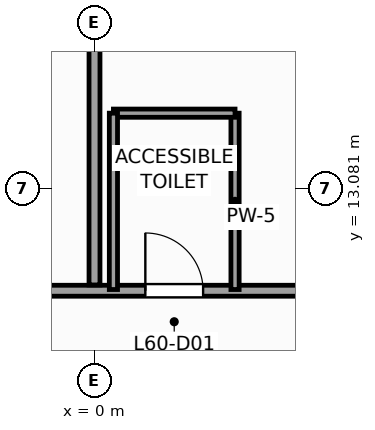
"""IFC4 building model, lengths in metres.
Left out: names, types, materials, properties, quantities, classifications, styles, units other than length and angle.
Written with IfcOpenShell. Run it as: python <this file> out.ifc"""

import sys

from ifc_helpers import new_model, si_unit, direction, frame, frame_2d, origin, place, context, subcontext, project, spatial, rectangle, extrude, source, transform, mapped, element, fill, save


model = new_model("IFC4")
c1 = context("Model", 3, precision=1e-05, world=origin(), true_north=direction((0.0, 1.0)))
c2 = subcontext(c1, "Body", "Model", "MODEL_VIEW")
j1 = project(units=[si_unit("LENGTHUNIT", "METRE"), si_unit("PLANEANGLEUNIT", "RADIAN")], contexts=[c1])
p1 = place(None, origin())
s1 = spatial("IfcSite", under=j1, at=p1, CompositionType="ELEMENT")
p2 = place(p1, origin())
s2 = spatial("IfcBuilding", under=s1, at=p2, CompositionType="ELEMENT")
p3 = place(p2, frame((0.0, 0.0, 248.5)))
s3 = spatial("IfcBuildingStorey", under=s2, at=p3, CompositionType="ELEMENT", Elevation=248.5)
p4 = place(p3, frame((29.154, 6.733, 0.0), z_axis=(0.0, 0.0, 1.0), x_axis=(-0.77714192302, 0.629325378072, 0.0)))
e1 = element("IfcWall", 1, at=p4, inside=s3, PredefinedType="STANDARD", context=c2, shape_type="SweptSolid", body=[
    extrude(rectangle(XDim=36.84, YDim=0.34, at=frame_2d((18.42, 0.0))), origin(), (0.0, 0.0, 1.0), 2.96),
])
p5 = place(p4, frame((3.721, 0.0, 0.48)))
e2 = element("IfcOpeningElement", 2, at=p5, cuts=e1, PredefinedType="OPENING", context=c2, shape_type="SweptSolid", body=[
    extrude(rectangle(XDim=1.4, YDim=2.4, at=frame_2d((0.7, 1.2))), frame((0.0, 0.18, 0.0), z_axis=(0.0, -1.0, 0.0), x_axis=(1.0, 0.0, 0.0)), (0.0, 0.0, 1.0), 0.36),
])
p6 = place(p4, frame((9.809, 0.0, 0.58)))
e3 = element("IfcOpeningElement", 3, at=p6, cuts=e1, PredefinedType="OPENING", context=c2, shape_type="SweptSolid", body=[
    extrude(rectangle(XDim=1.75, YDim=2.3, at=frame_2d((0.875, 1.15))), frame((0.0, 0.18, 0.0), z_axis=(0.0, -1.0, 0.0), x_axis=(1.0, 0.0, 0.0)), (0.0, 0.0, 1.0), 0.36),
])
p7 = place(p4, frame((16.058, 0.0, 0.58)))
e4 = element("IfcOpeningElement", 4, at=p7, cuts=e1, PredefinedType="OPENING", context=c2, shape_type="SweptSolid", body=[
    extrude(rectangle(XDim=1.75, YDim=2.3, at=frame_2d((0.875, 1.15))), frame((0.0, 0.18, 0.0), z_axis=(0.0, -1.0, 0.0), x_axis=(1.0, 0.0, 0.0)), (0.0, 0.0, 1.0), 0.36),
])
p8 = place(p4, frame((24.176, 0.0, 0.58)))
e5 = element("IfcOpeningElement", 5, at=p8, cuts=e1, PredefinedType="OPENING", context=c2, shape_type="SweptSolid", body=[
    extrude(rectangle(XDim=1.75, YDim=2.3, at=frame_2d((0.875, 1.15))), frame((0.0, 0.18, 0.0), z_axis=(0.0, -1.0, 0.0), x_axis=(1.0, 0.0, 0.0)), (0.0, 0.0, 1.0), 0.36),
])
p9 = place(p4, frame((30.982, 0.0, 0.48)))
e6 = element("IfcOpeningElement", 6, at=p9, cuts=e1, PredefinedType="OPENING", context=c2, shape_type="SweptSolid", body=[
    extrude(rectangle(XDim=1.4, YDim=2.4, at=frame_2d((0.7, 1.2))), frame((0.0, 0.18, 0.0), z_axis=(0.0, -1.0, 0.0), x_axis=(1.0, 0.0, 0.0)), (0.0, 0.0, 1.0), 0.36),
])
p10 = place(p3, frame((-10.3, 11.4, 0.0), z_axis=(0.0, 0.0, 1.0), x_axis=(1.0, 0.0, 0.0)))
e7 = element("IfcWall", 7, at=p10, inside=s3, PredefinedType="PARTITIONING", context=c2, shape_type="SweptSolid", body=[
    extrude(rectangle(XDim=22.75, YDim=0.18, at=frame_2d((11.375, 0.0))), origin(), (0.0, 0.0, 1.0), 3.66),
])
p11 = place(p10, frame((11.136, 0.0, 0.0)))
e8 = element("IfcOpeningElement", 8, at=p11, cuts=e7, PredefinedType="OPENING", context=c2, shape_type="SweptSolid", body=[
    extrude(rectangle(XDim=0.95, YDim=2.1, at=frame_2d((0.475, 1.05))), frame((0.0, 0.1, 0.0), z_axis=(0.0, -1.0, 0.0), x_axis=(1.0, 0.0, 0.0)), (0.0, 0.0, 1.0), 0.2),
])
p12 = place(p10, frame((1.58, 0.0, 0.0)))
e9 = element("IfcOpeningElement", 9, at=p12, cuts=e7, PredefinedType="OPENING", context=c2, shape_type="SweptSolid", body=[
    extrude(rectangle(XDim=0.95, YDim=2.1, at=frame_2d((0.475, 1.05))), frame((0.0, 0.1, 0.0), z_axis=(0.0, -1.0, 0.0), x_axis=(1.0, 0.0, 0.0)), (0.0, 0.0, 1.0), 0.2),
])
p13 = place(p3, frame((0.0, 11.495, 0.0), z_axis=(0.0, 0.0, 1.0), x_axis=(0.0, 1.0, 0.0)))
e10 = element("IfcWall", 10, at=p13, inside=s3, PredefinedType="PARTITIONING", context=c2, shape_type="SweptSolid", body=[
    extrude(rectangle(XDim=17.067, YDim=0.18, at=frame_2d((8.534, 0.0))), origin(), (0.0, 0.0, 1.0), 3.66),
])
p14 = place(p3, frame((2.311, 11.42, 0.0), z_axis=(0.0, 0.0, 1.0), x_axis=(0.0, 1.0, 0.0)))
e11 = element("IfcWall", 11, at=p14, inside=s3, PredefinedType="PARTITIONING", context=c2, shape_type="SweptSolid", body=[
    extrude(rectangle(XDim=2.9, YDim=0.135, at=frame_2d((1.45, 0.0))), origin(), (0.0, 0.0, 1.0), 3.66),
])
p15 = place(p3, frame((0.311, 14.32, 0.0), z_axis=(0.0, 0.0, 1.0), x_axis=(1.0, 0.0, 0.0)))
e12 = element("IfcWall", 12, at=p15, inside=s3, PredefinedType="PARTITIONING", context=c2, shape_type="SweptSolid", body=[
    extrude(rectangle(XDim=2.0, YDim=0.135, at=frame_2d((1.0, 0.0))), origin(), (0.0, 0.0, 1.0), 3.66),
])
p16 = place(p3, frame((0.311, 11.42, 0.0), z_axis=(0.0, 0.0, 1.0), x_axis=(0.0, 1.0, 0.0)))
e13 = element("IfcWall", 13, at=p16, inside=s3, PredefinedType="PARTITIONING", context=c2, shape_type="SweptSolid", body=[
    extrude(rectangle(XDim=2.9, YDim=0.135, at=frame_2d((1.45, 0.0))), origin(), (0.0, 0.0, 1.0), 3.66),
])
m1 = source(origin(), c2, "Body", "SweptSolid", [
    extrude(rectangle(XDim=0.95, YDim=2.1, at=frame_2d((0.475, 1.05))), frame((0.0, 0.025, 0.0), z_axis=(0.0, -1.0, 0.0), x_axis=(1.0, 0.0, 0.0)), (0.0, 0.0, 1.0), 0.05),
])
p17 = place(p11, origin())
e14 = element("IfcDoor", 14, at=p17, inside=s3, OperationType="SINGLE_SWING_LEFT", PredefinedType="DOOR", context=c2, shape_type="MappedRepresentation", body=[
    mapped(m1, transform((0.0, 0.0, 0.0), scale=1.0)),
])
fill(e8, e14)
save(model, sys.argv[1])
